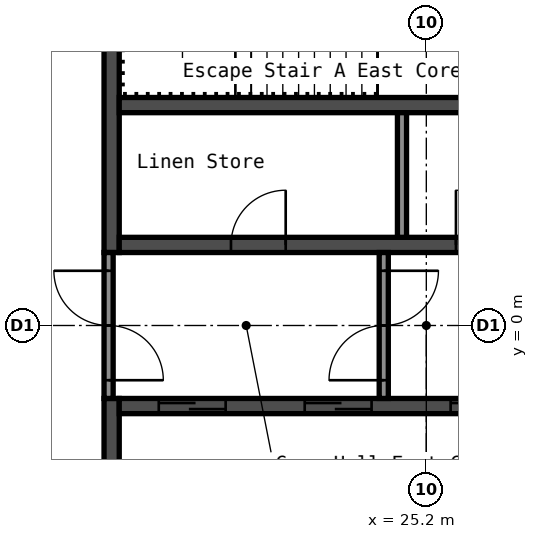
"""IFC4 building model, lengths in metres.
Left out: names, types, materials, properties, quantities, classifications, styles, units other than length and angle.
Written with IfcOpenShell. Run it as: python <this file> out.ifc"""

import sys

from ifc_helpers import new_model, si_unit, direction, frame, frame_2d, origin, place, context, subcontext, project, spatial, rectangle, extrude, element, fill, save


model = new_model("IFC4")
c1 = context("Model", 3, precision=1e-05, world=origin(), true_north=direction((0.0, 1.0)))
c2 = subcontext(c1, "Body", "Model", "MODEL_VIEW")
j1 = project(units=[si_unit("LENGTHUNIT", "METRE"), si_unit("PLANEANGLEUNIT", "RADIAN")], contexts=[c1])
p1 = place(None, origin())
s1 = spatial("IfcSite", under=j1, at=p1, CompositionType="ELEMENT")
p2 = place(p1, origin())
s2 = spatial("IfcBuilding", under=s1, at=p2, CompositionType="ELEMENT")
p3 = place(p2, frame((0.0, 0.0, 221.8)))
s3 = spatial("IfcBuildingStorey", under=s2, at=p3, CompositionType="ELEMENT", Elevation=221.8)
p4 = place(p3, frame((20.025, 1.2, 0.0), z_axis=(0.0, 0.0, 1.0), x_axis=(0.0, 1.0, 0.0)))
e1 = element("IfcWall", 1, at=p4, inside=s3, PredefinedType="SHEAR", context=c2, shape_type="SweptSolid", body=[
    extrude(rectangle(XDim=6.3, YDim=0.25, at=frame_2d((3.15, 0.0))), origin(), (0.0, 0.0, 1.0), 2.75),
])
p5 = place(p3, frame((20.025, -7.5, 0.0), z_axis=(0.0, 0.0, 1.0), x_axis=(0.0, 1.0, 0.0)))
e2 = element("IfcWall", 2, at=p5, inside=s3, PredefinedType="SHEAR", context=c2, shape_type="SweptSolid", body=[
    extrude(rectangle(XDim=6.3, YDim=0.25, at=frame_2d((3.15, 0.0))), origin(), (0.0, 0.0, 1.0), 2.75),
])
p6 = place(p5, frame((2.4, 0.0, 0.0)))
e3 = element("IfcOpeningElement", 3, at=p6, cuts=e2, PredefinedType="OPENING", context=c2, shape_type="SweptSolid", body=[
    extrude(rectangle(XDim=1.0, YDim=2.1, at=frame_2d((0.5, 1.05))), frame((0.0, 0.135, 0.0), z_axis=(0.0, -1.0, 0.0), x_axis=(1.0, 0.0, 0.0)), (0.0, 0.0, 1.0), 0.27),
])
p7 = place(p3, frame((20.15, 1.325, 0.0), z_axis=(0.0, 0.0, 1.0), x_axis=(1.0, 0.0, 0.0)))
e4 = element("IfcWall", 4, at=p7, inside=s3, PredefinedType="SHEAR", context=c2, shape_type="SweptSolid", body=[
    extrude(rectangle(XDim=7.5, YDim=0.25, at=frame_2d((3.75, 0.0))), origin(), (0.0, 0.0, 1.0), 2.75),
])
p8 = place(p7, frame((1.837, 0.0, 0.0)))
e5 = element("IfcOpeningElement", 5, at=p8, cuts=e4, PredefinedType="OPENING", context=c2, shape_type="SweptSolid", body=[
    extrude(rectangle(XDim=0.9, YDim=2.1, at=frame_2d((0.45, 1.05))), frame((0.0, 0.135, 0.0), z_axis=(0.0, -1.0, 0.0), x_axis=(1.0, 0.0, 0.0)), (0.0, 0.0, 1.0), 0.27),
])
p9 = place(p7, frame((5.538, 0.0, 0.0)))
e6 = element("IfcOpeningElement", 6, at=p9, cuts=e4, PredefinedType="OPENING", context=c2, shape_type="SweptSolid", body=[
    extrude(rectangle(XDim=0.9, YDim=2.1, at=frame_2d((0.45, 1.05))), frame((0.0, 0.135, 0.0), z_axis=(0.0, -1.0, 0.0), x_axis=(1.0, 0.0, 0.0)), (0.0, 0.0, 1.0), 0.27),
])
p10 = place(p3, frame((20.15, 3.625, 0.0), z_axis=(0.0, 0.0, 1.0), x_axis=(1.0, 0.0, 0.0)))
e7 = element("IfcWall", 7, at=p10, inside=s3, PredefinedType="SHEAR", context=c2, shape_type="SweptSolid", body=[
    extrude(rectangle(XDim=7.5, YDim=0.25, at=frame_2d((3.75, 0.0))), origin(), (0.0, 0.0, 1.0), 2.75),
])
p11 = place(p3, frame((20.15, -1.325, 0.0), z_axis=(0.0, 0.0, 1.0), x_axis=(1.0, 0.0, 0.0)))
e8 = element("IfcWall", 8, at=p11, inside=s3, PredefinedType="SHEAR", context=c2, shape_type="SweptSolid", body=[
    extrude(rectangle(XDim=7.5, YDim=0.25, at=frame_2d((3.75, 0.0))), origin(), (0.0, 0.0, 1.0), 2.75),
])
p12 = place(p11, frame((0.65, 0.0, 0.0)))
e9 = element("IfcOpeningElement", 9, at=p12, cuts=e8, PredefinedType="OPENING", context=c2, shape_type="SweptSolid", body=[
    extrude(rectangle(XDim=1.1, YDim=2.1, at=frame_2d((0.55, 1.05))), frame((0.0, 0.135, 0.0), z_axis=(0.0, -1.0, 0.0), x_axis=(1.0, 0.0, 0.0)), (0.0, 0.0, 1.0), 0.27),
])
p13 = place(p11, frame((3.05, 0.0, 0.0)))
e10 = element("IfcOpeningElement", 10, at=p13, cuts=e8, PredefinedType="OPENING", context=c2, shape_type="SweptSolid", body=[
    extrude(rectangle(XDim=1.1, YDim=2.1, at=frame_2d((0.55, 1.05))), frame((0.0, 0.135, 0.0), z_axis=(0.0, -1.0, 0.0), x_axis=(1.0, 0.0, 0.0)), (0.0, 0.0, 1.0), 0.27),
])
p14 = place(p11, frame((5.45, 0.0, 0.0)))
e11 = element("IfcOpeningElement", 11, at=p14, cuts=e8, PredefinedType="OPENING", context=c2, shape_type="SweptSolid", body=[
    extrude(rectangle(XDim=1.1, YDim=2.1, at=frame_2d((0.55, 1.05))), frame((0.0, 0.135, 0.0), z_axis=(0.0, -1.0, 0.0), x_axis=(1.0, 0.0, 0.0)), (0.0, 0.0, 1.0), 0.27),
])
p15 = place(p3, frame((19.975, -1.2, 0.0), z_axis=(0.0, 0.0, 1.0), x_axis=(0.0, 1.0, 0.0)))
e12 = element("IfcWall", 12, at=p15, inside=s3, PredefinedType="PARTITIONING", context=c2, shape_type="SweptSolid", body=[
    extrude(rectangle(XDim=2.4, YDim=0.15, at=frame_2d((1.2, 0.0))), origin(), (0.0, 0.0, 1.0), 2.75),
])
p16 = place(p15, frame((0.3, 0.0, 0.0)))
e13 = element("IfcOpeningElement", 13, at=p16, cuts=e12, PredefinedType="OPENING", context=c2, shape_type="SweptSolid", body=[
    extrude(rectangle(XDim=1.8, YDim=2.1, at=frame_2d((0.9, 1.05))), frame((0.0, 0.085, 0.0), z_axis=(0.0, -1.0, 0.0), x_axis=(1.0, 0.0, 0.0)), (0.0, 0.0, 1.0), 0.17),
])
p17 = place(p3, frame((24.5, -1.2, 0.0), z_axis=(0.0, 0.0, 1.0), x_axis=(0.0, 1.0, 0.0)))
e14 = element("IfcWall", 14, at=p17, inside=s3, PredefinedType="PARTITIONING", context=c2, shape_type="SweptSolid", body=[
    extrude(rectangle(XDim=2.4, YDim=0.15, at=frame_2d((1.2, 0.0))), origin(), (0.0, 0.0, 1.0), 2.75),
])
p18 = place(p17, frame((0.3, 0.0, 0.0)))
e15 = element("IfcOpeningElement", 15, at=p18, cuts=e14, PredefinedType="OPENING", context=c2, shape_type="SweptSolid", body=[
    extrude(rectangle(XDim=1.8, YDim=2.1, at=frame_2d((0.9, 1.05))), frame((0.0, 0.085, 0.0), z_axis=(0.0, -1.0, 0.0), x_axis=(1.0, 0.0, 0.0)), (0.0, 0.0, 1.0), 0.17),
])
p19 = place(p3, frame((24.8, 1.45, 0.0), z_axis=(0.0, 0.0, 1.0), x_axis=(0.0, 1.0, 0.0)))
e16 = element("IfcWall", 16, at=p19, inside=s3, PredefinedType="PARTITIONING", context=c2, shape_type="SweptSolid", body=[
    extrude(rectangle(XDim=2.05, YDim=0.15, at=frame_2d((1.025, 0.0))), origin(), (0.0, 0.0, 1.0), 2.75),
])
p20 = place(p16, origin())
e17 = element("IfcDoor", 17, at=p20, inside=s3, OperationType="DOUBLE_DOOR_SINGLE_SWING", PredefinedType="DOOR", context=c2, shape_type="SweptSolid", body=[
    extrude(rectangle(XDim=1.8, YDim=2.1, at=frame_2d((0.9, 1.05))), frame((0.0, 0.025, 0.0), z_axis=(0.0, -1.0, 0.0), x_axis=(1.0, 0.0, 0.0)), (0.0, 0.0, 1.0), 0.05),
])
fill(e13, e17)
p21 = place(p18, origin())
e18 = element("IfcDoor", 18, at=p21, inside=s3, OperationType="DOUBLE_DOOR_SINGLE_SWING", PredefinedType="DOOR", context=c2, shape_type="SweptSolid", body=[
    extrude(rectangle(XDim=1.8, YDim=2.1, at=frame_2d((0.9, 1.05))), frame((0.0, 0.025, 0.0), z_axis=(0.0, -1.0, 0.0), x_axis=(1.0, 0.0, 0.0)), (0.0, 0.0, 1.0), 0.05),
])
fill(e15, e18)
p22 = place(p8, origin())
e19 = element("IfcDoor", 19, at=p22, inside=s3, OperationType="SINGLE_SWING_LEFT", PredefinedType="DOOR", context=c2, shape_type="SweptSolid", body=[
    extrude(rectangle(XDim=0.9, YDim=2.1, at=frame_2d((0.45, 1.05))), frame((0.0, 0.025, 0.0), z_axis=(0.0, -1.0, 0.0), x_axis=(1.0, 0.0, 0.0)), (0.0, 0.0, 1.0), 0.05),
])
fill(e5, e19)
p23 = place(p9, origin())
e20 = element("IfcDoor", 20, at=p23, inside=s3, OperationType="SINGLE_SWING_RIGHT", PredefinedType="DOOR", context=c2, shape_type="SweptSolid", body=[
    extrude(rectangle(XDim=0.9, YDim=2.1, at=frame_2d((0.45, 1.05))), frame((0.0, 0.025, 0.0), z_axis=(0.0, -1.0, 0.0), x_axis=(1.0, 0.0, 0.0)), (0.0, 0.0, 1.0), 0.05),
])
fill(e6, e20)
p24 = place(p12, origin())
e21 = element("IfcDoor", 21, at=p24, inside=s3, OperationType="DOUBLE_DOOR_SLIDING", PredefinedType="DOOR", context=c2, shape_type="SweptSolid", body=[
    extrude(rectangle(XDim=1.1, YDim=2.1, at=frame_2d((0.55, 1.05))), frame((0.0, 0.025, 0.0), z_axis=(0.0, -1.0, 0.0), x_axis=(1.0, 0.0, 0.0)), (0.0, 0.0, 1.0), 0.05),
])
fill(e9, e21)
p25 = place(p13, origin())
e22 = element("IfcDoor", 22, at=p25, inside=s3, OperationType="DOUBLE_DOOR_SLIDING", PredefinedType="DOOR", context=c2, shape_type="SweptSolid", body=[
    extrude(rectangle(XDim=1.1, YDim=2.1, at=frame_2d((0.55, 1.05))), frame((0.0, 0.025, 0.0), z_axis=(0.0, -1.0, 0.0), x_axis=(1.0, 0.0, 0.0)), (0.0, 0.0, 1.0), 0.05),
])
fill(e10, e22)
p26 = place(p14, origin())
e23 = element("IfcDoor", 23, at=p26, inside=s3, OperationType="DOUBLE_DOOR_SLIDING", PredefinedType="DOOR", context=c2, shape_type="SweptSolid", body=[
    extrude(rectangle(XDim=1.1, YDim=2.1, at=frame_2d((0.55, 1.05))), frame((0.0, 0.025, 0.0), z_axis=(0.0, -1.0, 0.0), x_axis=(1.0, 0.0, 0.0)), (0.0, 0.0, 1.0), 0.05),
])
fill(e11, e23)
save(model, sys.argv[1])
